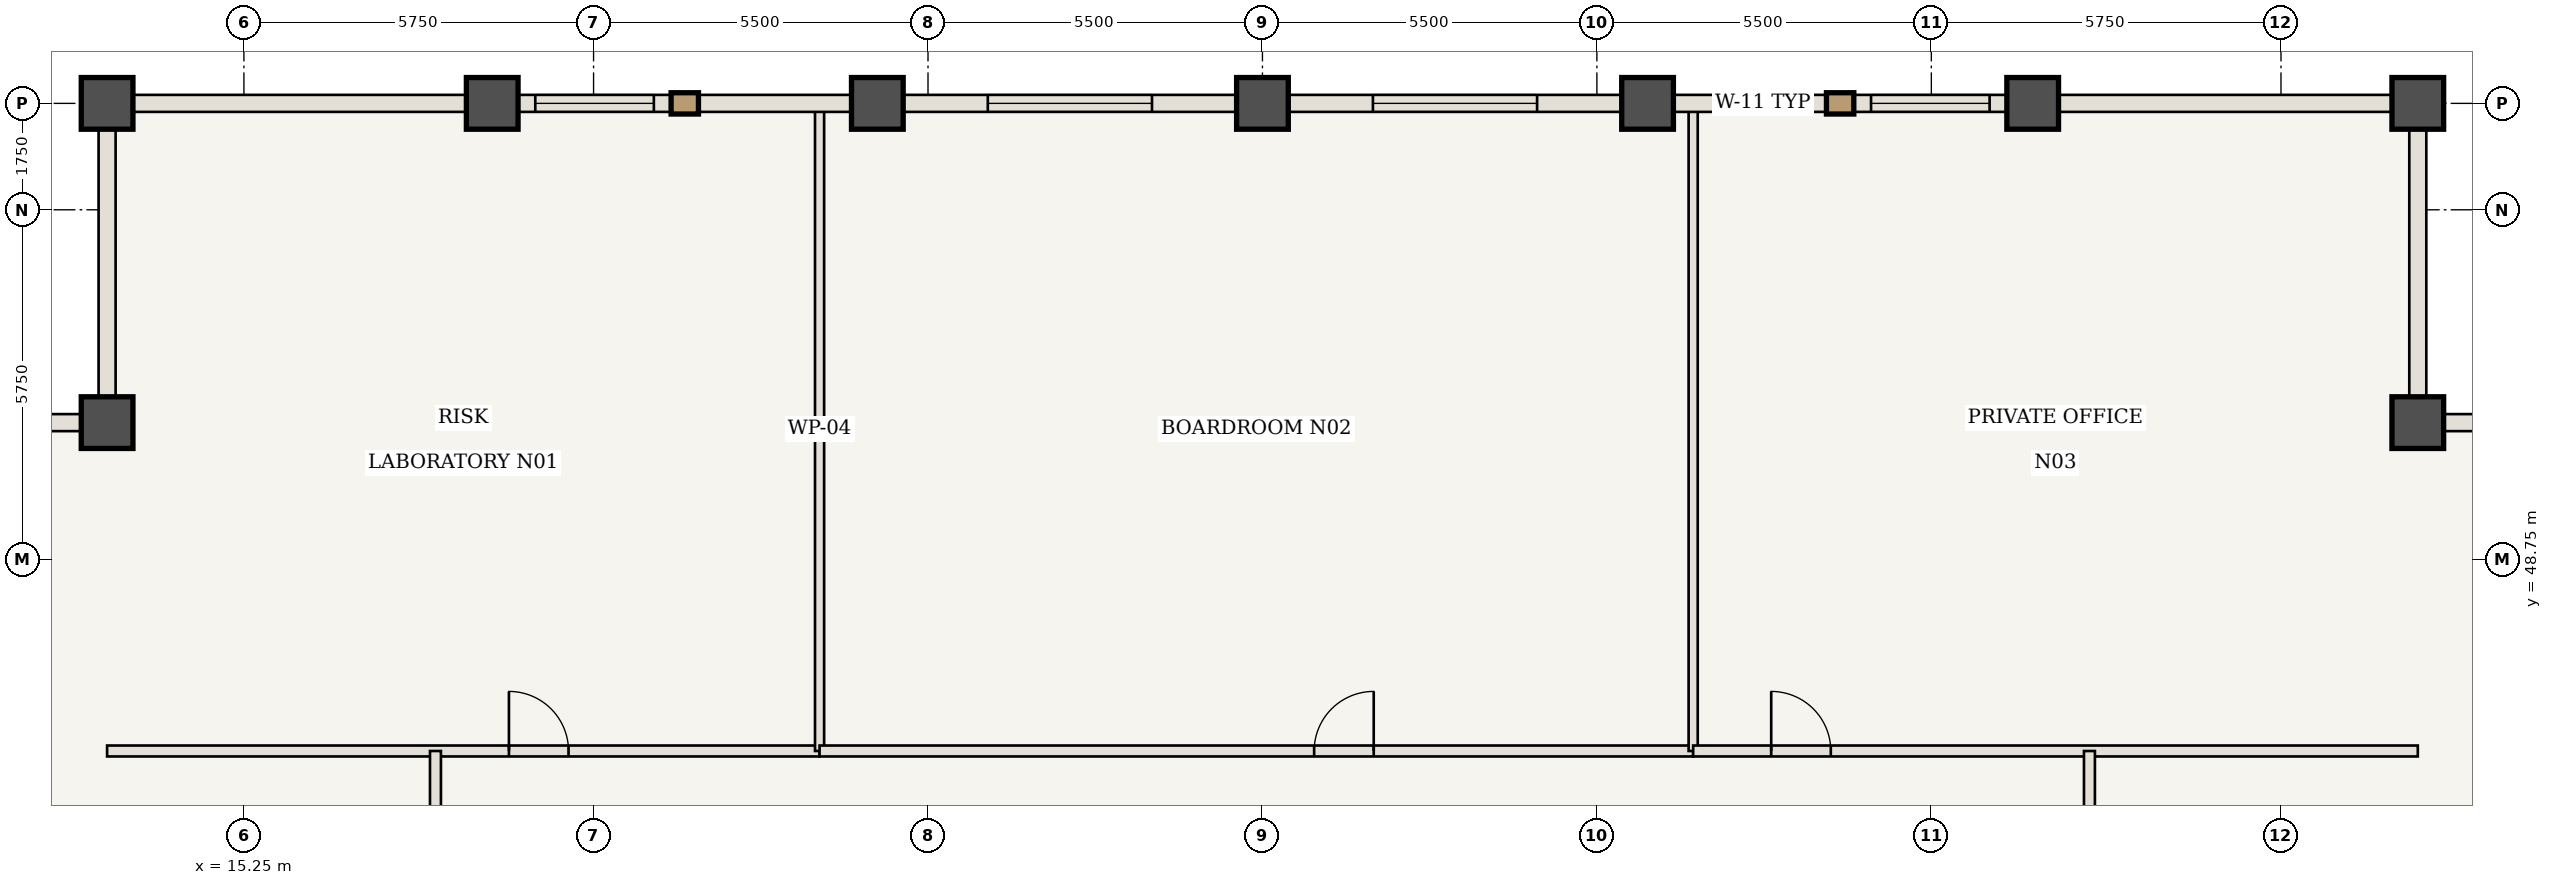
"""IFC4 building model, lengths in metres.
Left out: names, types, materials, properties, quantities, classifications, styles, units other than length and angle.
Written with IfcOpenShell. Run it as: python <this file> out.ifc"""

import sys

from ifc_helpers import new_model, si_unit, direction, frame, frame_2d, origin, origin_2d, place, context, subcontext, project, spatial, rectangle, extrude, element, fill, save


model = new_model("IFC4")
c1 = context("Model", 3, precision=1e-05, world=origin(), true_north=direction((0.0, 1.0)))
c2 = subcontext(c1, "Body", "Model", "MODEL_VIEW")
j1 = project(units=[si_unit("LENGTHUNIT", "METRE"), si_unit("PLANEANGLEUNIT", "RADIAN")], contexts=[c1])
p1 = place(None, origin())
s1 = spatial("IfcSite", under=j1, at=p1, CompositionType="ELEMENT")
p2 = place(p1, origin())
s2 = spatial("IfcBuilding", under=s1, at=p2, CompositionType="ELEMENT")
p3 = place(p2, frame((0.0, 0.0, 194.6)))
s3 = spatial("IfcBuildingStorey", under=s2, at=p3, CompositionType="ELEMENT", Elevation=194.6)
for number, where, z_axis, x_axis in (
    (1, (51.0, 51.0, 0.0), (0.0, 0.0, 1.0), (1.0, 0.0, 0.0)),
    (2, (51.0, 56.25, 0.0), (0.0, 0.0, 1.0), (1.0, 0.0, 0.0)),
    (3, (13.0, 56.25, 0.0), (0.0, 0.0, 1.0), (1.0, 0.0, 0.0)),
    (4, (13.0, 51.0, 0.0), (0.0, 0.0, 1.0), (1.0, 0.0, 0.0)),
    (5, (19.333, 56.25, 0.0), (0.0, 0.0, 1.0), (1.0, 0.0, 0.0)),
    (6, (25.667, 56.25, 0.0), (0.0, 0.0, 1.0), (1.0, 0.0, 0.0)),
    (7, (32.0, 56.25, 0.0), (0.0, 0.0, 1.0), (1.0, 0.0, 0.0)),
    (8, (38.333, 56.25, 0.0), (0.0, 0.0, 1.0), (1.0, 0.0, 0.0)),
    (9, (44.667, 56.25, 0.0), (0.0, 0.0, 1.0), (1.0, 0.0, 0.0)),
):
    element("IfcColumn", number, at=place(p3, frame(where, z_axis=z_axis, x_axis=x_axis)), inside=s3, PredefinedType="COLUMN", context=c2, shape_type="SweptSolid", body=[
        extrude(rectangle(XDim=0.85, YDim=0.85, at=origin_2d()), origin(), (0.0, 0.0, 1.0), 3.85),
    ])
p4 = place(p3, frame((13.0, 45.6, 0.0), z_axis=(0.0, 0.0, 1.0), x_axis=(1.0, 0.0, 0.0)))
e10 = element("IfcWall", 10, at=p4, inside=s3, PredefinedType="STANDARD", context=c2, shape_type="SweptSolid", body=[
    extrude(rectangle(XDim=11.717, YDim=0.18, at=frame_2d((5.858, 0.0))), origin(), (0.0, 0.0, 1.0), 3.685),
])
p5 = place(p4, frame((6.608, 0.0, 0.0)))
e11 = element("IfcOpeningElement", 11, at=p5, cuts=e10, PredefinedType="OPENING", context=c2, shape_type="SweptSolid", body=[
    extrude(rectangle(XDim=0.98, YDim=2.2, at=frame_2d((0.49, 1.1))), frame((0.0, 0.1, 0.0), z_axis=(0.0, -1.0, 0.0), x_axis=(1.0, 0.0, 0.0)), (0.0, 0.0, 1.0), 0.2),
])
p6 = place(p3, frame((24.717, 45.6, 0.0), z_axis=(0.0, 0.0, 1.0), x_axis=(0.0, 1.0, 0.0)))
e12 = element("IfcWall", 12, at=p6, inside=s3, PredefinedType="STANDARD", context=c2, shape_type="SweptSolid", body=[
    extrude(rectangle(XDim=10.59, YDim=0.15, at=frame_2d((5.295, 0.0))), origin(), (0.0, 0.0, 1.0), 3.685),
])
p7 = place(p3, frame((24.717, 45.6, 0.0), z_axis=(0.0, 0.0, 1.0), x_axis=(1.0, 0.0, 0.0)))
e13 = element("IfcWall", 13, at=p7, inside=s3, PredefinedType="STANDARD", context=c2, shape_type="SweptSolid", body=[
    extrude(rectangle(XDim=14.366, YDim=0.18, at=frame_2d((7.183, 0.0))), origin(), (0.0, 0.0, 1.0), 3.685),
])
p8 = place(p7, frame((8.133, 0.0, 0.0)))
e14 = element("IfcOpeningElement", 14, at=p8, cuts=e13, PredefinedType="OPENING", context=c2, shape_type="SweptSolid", body=[
    extrude(rectangle(XDim=0.98, YDim=2.2, at=frame_2d((0.49, 1.1))), frame((0.0, 0.1, 0.0), z_axis=(0.0, -1.0, 0.0), x_axis=(1.0, 0.0, 0.0)), (0.0, 0.0, 1.0), 0.2),
])
p9 = place(p3, frame((39.083, 45.6, 0.0), z_axis=(0.0, 0.0, 1.0), x_axis=(0.0, 1.0, 0.0)))
e15 = element("IfcWall", 15, at=p9, inside=s3, PredefinedType="STANDARD", context=c2, shape_type="SweptSolid", body=[
    extrude(rectangle(XDim=10.59, YDim=0.15, at=frame_2d((5.295, 0.0))), origin(), (0.0, 0.0, 1.0), 3.685),
])
p10 = place(p3, frame((39.083, 45.6, 0.0), z_axis=(0.0, 0.0, 1.0), x_axis=(1.0, 0.0, 0.0)))
e16 = element("IfcWall", 16, at=p10, inside=s3, PredefinedType="STANDARD", context=c2, shape_type="SweptSolid", body=[
    extrude(rectangle(XDim=11.917, YDim=0.18, at=frame_2d((5.958, 0.0))), origin(), (0.0, 0.0, 1.0), 3.685),
])
p11 = place(p10, frame((1.283, 0.0, 0.0)))
e17 = element("IfcOpeningElement", 17, at=p11, cuts=e16, PredefinedType="OPENING", context=c2, shape_type="SweptSolid", body=[
    extrude(rectangle(XDim=0.98, YDim=2.2, at=frame_2d((0.49, 1.1))), frame((0.0, 0.1, 0.0), z_axis=(0.0, -1.0, 0.0), x_axis=(1.0, 0.0, 0.0)), (0.0, 0.0, 1.0), 0.2),
])
p12 = place(p3, frame((18.4, 37.833, 0.0), z_axis=(0.0, 0.0, 1.0), x_axis=(0.0, 1.0, 0.0)))
e18 = element("IfcWall", 18, at=p12, inside=s3, PredefinedType="STANDARD", context=c2, shape_type="SweptSolid", body=[
    extrude(rectangle(XDim=7.767, YDim=0.18, at=frame_2d((3.883, 0.0))), origin(), (0.0, 0.0, 1.0), 3.685),
])
p13 = place(p12, frame((3.383, 0.0, 0.0)))
e19 = element("IfcOpeningElement", 19, at=p13, cuts=e18, PredefinedType="OPENING", context=c2, shape_type="SweptSolid", body=[
    extrude(rectangle(XDim=0.98, YDim=2.2, at=frame_2d((0.49, 1.1))), frame((0.0, 0.1, 0.0), z_axis=(0.0, -1.0, 0.0), x_axis=(1.0, 0.0, 0.0)), (0.0, 0.0, 1.0), 0.2),
])
p14 = place(p3, frame((45.6, 31.8, 0.0), z_axis=(0.0, 0.0, 1.0), x_axis=(0.0, 1.0, 0.0)))
e20 = element("IfcWall", 20, at=p14, inside=s3, PredefinedType="STANDARD", context=c2, shape_type="SweptSolid", body=[
    extrude(rectangle(XDim=13.8, YDim=0.18, at=frame_2d((6.9, 0.0))), origin(), (0.0, 0.0, 1.0), 3.685),
])
p15 = place(p14, frame((6.4, 0.0, 0.0)))
e21 = element("IfcOpeningElement", 21, at=p15, cuts=e20, PredefinedType="OPENING", context=c2, shape_type="SweptSolid", body=[
    extrude(rectangle(XDim=0.98, YDim=2.2, at=frame_2d((0.49, 1.1))), frame((0.0, 0.1, 0.0), z_axis=(0.0, -1.0, 0.0), x_axis=(1.0, 0.0, 0.0)), (0.0, 0.0, 1.0), 0.2),
])
p16 = place(p3, frame((13.0, 56.25, 0.0), z_axis=(0.0, 0.0, 1.0), x_axis=(1.0, 0.0, 0.0)))
e22 = element("IfcWall", 22, at=p16, inside=s3, PredefinedType="USERDEFINED", context=c2, shape_type="SweptSolid", body=[
    extrude(rectangle(XDim=6.333, YDim=0.28, at=frame_2d((3.167, 0.0))), origin(), (0.0, 0.0, 1.0), 2.985),
])
p17 = place(p3, frame((19.333, 56.25, 0.0), z_axis=(0.0, 0.0, 1.0), x_axis=(1.0, 0.0, 0.0)))
e23 = element("IfcWall", 23, at=p17, inside=s3, PredefinedType="USERDEFINED", context=c2, shape_type="SweptSolid", body=[
    extrude(rectangle(XDim=6.333, YDim=0.28, at=frame_2d((3.167, 0.0))), origin(), (0.0, 0.0, 1.0), 2.985),
])
p18 = place(p17, frame((0.708, 0.0, 0.85)))
e24 = element("IfcOpeningElement", 24, at=p18, cuts=e23, PredefinedType="OPENING", context=c2, shape_type="SweptSolid", body=[
    extrude(rectangle(XDim=1.95, YDim=1.935, at=frame_2d((0.975, 0.968))), frame((0.0, 0.15, 0.0), z_axis=(0.0, -1.0, 0.0), x_axis=(1.0, 0.0, 0.0)), (0.0, 0.0, 1.0), 0.3),
])
p19 = place(p3, frame((25.667, 56.25, 0.0), z_axis=(0.0, 0.0, 1.0), x_axis=(1.0, 0.0, 0.0)))
e25 = element("IfcWall", 25, at=p19, inside=s3, PredefinedType="USERDEFINED", context=c2, shape_type="SweptSolid", body=[
    extrude(rectangle(XDim=6.333, YDim=0.28, at=frame_2d((3.167, 0.0))), origin(), (0.0, 0.0, 1.0), 2.985),
])
p20 = place(p19, frame((1.817, 0.0, 0.85)))
e26 = element("IfcOpeningElement", 26, at=p20, cuts=e25, PredefinedType="OPENING", context=c2, shape_type="SweptSolid", body=[
    extrude(rectangle(XDim=2.7, YDim=1.935, at=frame_2d((1.35, 0.968))), frame((0.0, 0.15, 0.0), z_axis=(0.0, -1.0, 0.0), x_axis=(1.0, 0.0, 0.0)), (0.0, 0.0, 1.0), 0.3),
])
p21 = place(p3, frame((32.0, 56.25, 0.0), z_axis=(0.0, 0.0, 1.0), x_axis=(1.0, 0.0, 0.0)))
e27 = element("IfcWall", 27, at=p21, inside=s3, PredefinedType="USERDEFINED", context=c2, shape_type="SweptSolid", body=[
    extrude(rectangle(XDim=6.333, YDim=0.28, at=frame_2d((3.167, 0.0))), origin(), (0.0, 0.0, 1.0), 2.985),
])
p22 = place(p21, frame((1.817, 0.0, 0.85)))
e28 = element("IfcOpeningElement", 28, at=p22, cuts=e27, PredefinedType="OPENING", context=c2, shape_type="SweptSolid", body=[
    extrude(rectangle(XDim=2.7, YDim=1.935, at=frame_2d((1.35, 0.968))), frame((0.0, 0.15, 0.0), z_axis=(0.0, -1.0, 0.0), x_axis=(1.0, 0.0, 0.0)), (0.0, 0.0, 1.0), 0.3),
])
p23 = place(p3, frame((38.333, 56.25, 0.0), z_axis=(0.0, 0.0, 1.0), x_axis=(1.0, 0.0, 0.0)))
e29 = element("IfcWall", 29, at=p23, inside=s3, PredefinedType="USERDEFINED", context=c2, shape_type="SweptSolid", body=[
    extrude(rectangle(XDim=6.333, YDim=0.28, at=frame_2d((3.167, 0.0))), origin(), (0.0, 0.0, 1.0), 2.985),
])
p24 = place(p23, frame((1.096, 0.0, 0.85)))
e30 = element("IfcOpeningElement", 30, at=p24, cuts=e29, PredefinedType="OPENING", context=c2, shape_type="SweptSolid", body=[
    extrude(rectangle(XDim=1.6, YDim=1.935, at=frame_2d((0.8, 0.968))), frame((0.0, 0.15, 0.0), z_axis=(0.0, -1.0, 0.0), x_axis=(1.0, 0.0, 0.0)), (0.0, 0.0, 1.0), 0.3),
])
p25 = place(p23, frame((3.675, 0.0, 0.85)))
e31 = element("IfcOpeningElement", 31, at=p25, cuts=e29, PredefinedType="OPENING", context=c2, shape_type="SweptSolid", body=[
    extrude(rectangle(XDim=1.95, YDim=1.935, at=frame_2d((0.975, 0.968))), frame((0.0, 0.15, 0.0), z_axis=(0.0, -1.0, 0.0), x_axis=(1.0, 0.0, 0.0)), (0.0, 0.0, 1.0), 0.3),
])
p26 = place(p3, frame((44.667, 56.25, 0.0), z_axis=(0.0, 0.0, 1.0), x_axis=(1.0, 0.0, 0.0)))
e32 = element("IfcWall", 32, at=p26, inside=s3, PredefinedType="USERDEFINED", context=c2, shape_type="SweptSolid", body=[
    extrude(rectangle(XDim=6.333, YDim=0.28, at=frame_2d((3.167, 0.0))), origin(), (0.0, 0.0, 1.0), 2.985),
])
for number, where, z_axis, x_axis in (
    (33, (51.0, 51.0, 0.0), (0.0, 0.0, 1.0), (1.0, 0.0, 0.0)),
    (34, (51.0, 56.25, 0.0), (0.0, 0.0, 1.0), (0.0, -1.0, 0.0)),
    (35, (13.0, 51.0, 0.0), (0.0, 0.0, 1.0), (0.0, 1.0, 0.0)),
    (36, (7.75, 51.0, 0.0), (0.0, 0.0, 1.0), (1.0, 0.0, 0.0)),
):
    element("IfcWall", number, at=place(p3, frame(where, z_axis=z_axis, x_axis=x_axis)), inside=s3, PredefinedType="USERDEFINED", context=c2, shape_type="SweptSolid", body=[
        extrude(rectangle(XDim=5.25, YDim=0.28, at=frame_2d((2.625, 0.0))), origin(), (0.0, 0.0, 1.0), 2.985),
    ])
p27 = place(p5, origin())
e37 = element("IfcDoor", 37, at=p27, inside=s3, OperationType="SINGLE_SWING_LEFT", PredefinedType="DOOR", context=c2, shape_type="SweptSolid", body=[
    extrude(rectangle(XDim=0.98, YDim=2.2, at=frame_2d((0.49, 1.1))), frame((0.0, 0.025, 0.0), z_axis=(0.0, -1.0, 0.0), x_axis=(1.0, 0.0, 0.0)), (0.0, 0.0, 1.0), 0.05),
])
fill(e11, e37)
p28 = place(p8, origin())
e38 = element("IfcDoor", 38, at=p28, inside=s3, OperationType="SINGLE_SWING_RIGHT", PredefinedType="DOOR", context=c2, shape_type="SweptSolid", body=[
    extrude(rectangle(XDim=0.98, YDim=2.2, at=frame_2d((0.49, 1.1))), frame((0.0, 0.025, 0.0), z_axis=(0.0, -1.0, 0.0), x_axis=(1.0, 0.0, 0.0)), (0.0, 0.0, 1.0), 0.05),
])
fill(e14, e38)
p29 = place(p11, origin())
e39 = element("IfcDoor", 39, at=p29, inside=s3, OperationType="SINGLE_SWING_LEFT", PredefinedType="DOOR", context=c2, shape_type="SweptSolid", body=[
    extrude(rectangle(XDim=0.98, YDim=2.2, at=frame_2d((0.49, 1.1))), frame((0.0, 0.025, 0.0), z_axis=(0.0, -1.0, 0.0), x_axis=(1.0, 0.0, 0.0)), (0.0, 0.0, 1.0), 0.05),
])
fill(e17, e39)
p30 = place(p18, origin())
e40 = element("IfcWindow", 40, at=p30, inside=s3, PartitioningType="SINGLE_PANEL", PredefinedType="WINDOW", context=c2, shape_type="SweptSolid", body=[
    extrude(rectangle(XDim=1.95, YDim=1.935, at=frame_2d((0.975, 0.968))), frame((0.0, 0.03, 0.0), z_axis=(0.0, -1.0, 0.0), x_axis=(1.0, 0.0, 0.0)), (0.0, 0.0, 1.0), 0.06),
])
fill(e24, e40)
p31 = place(p20, origin())
e41 = element("IfcWindow", 41, at=p31, inside=s3, PartitioningType="SINGLE_PANEL", PredefinedType="WINDOW", context=c2, shape_type="SweptSolid", body=[
    extrude(rectangle(XDim=2.7, YDim=1.935, at=frame_2d((1.35, 0.968))), frame((0.0, 0.03, 0.0), z_axis=(0.0, -1.0, 0.0), x_axis=(1.0, 0.0, 0.0)), (0.0, 0.0, 1.0), 0.06),
])
fill(e26, e41)
p32 = place(p22, origin())
e42 = element("IfcWindow", 42, at=p32, inside=s3, PartitioningType="SINGLE_PANEL", PredefinedType="WINDOW", context=c2, shape_type="SweptSolid", body=[
    extrude(rectangle(XDim=2.7, YDim=1.935, at=frame_2d((1.35, 0.968))), frame((0.0, 0.03, 0.0), z_axis=(0.0, -1.0, 0.0), x_axis=(1.0, 0.0, 0.0)), (0.0, 0.0, 1.0), 0.06),
])
fill(e28, e42)
p33 = place(p24, origin())
e43 = element("IfcWindow", 43, at=p33, inside=s3, PartitioningType="SINGLE_PANEL", PredefinedType="WINDOW", context=c2, shape_type="SweptSolid", body=[
    extrude(rectangle(XDim=1.6, YDim=1.935, at=frame_2d((0.8, 0.968))), frame((0.0, 0.03, 0.0), z_axis=(0.0, -1.0, 0.0), x_axis=(1.0, 0.0, 0.0)), (0.0, 0.0, 1.0), 0.06),
])
fill(e30, e43)
p34 = place(p25, origin())
e44 = element("IfcWindow", 44, at=p34, inside=s3, PartitioningType="SINGLE_PANEL", PredefinedType="WINDOW", context=c2, shape_type="SweptSolid", body=[
    extrude(rectangle(XDim=1.95, YDim=1.935, at=frame_2d((0.975, 0.968))), frame((0.0, 0.03, 0.0), z_axis=(0.0, -1.0, 0.0), x_axis=(1.0, 0.0, 0.0)), (0.0, 0.0, 1.0), 0.06),
])
fill(e31, e44)
save(model, sys.argv[1])
